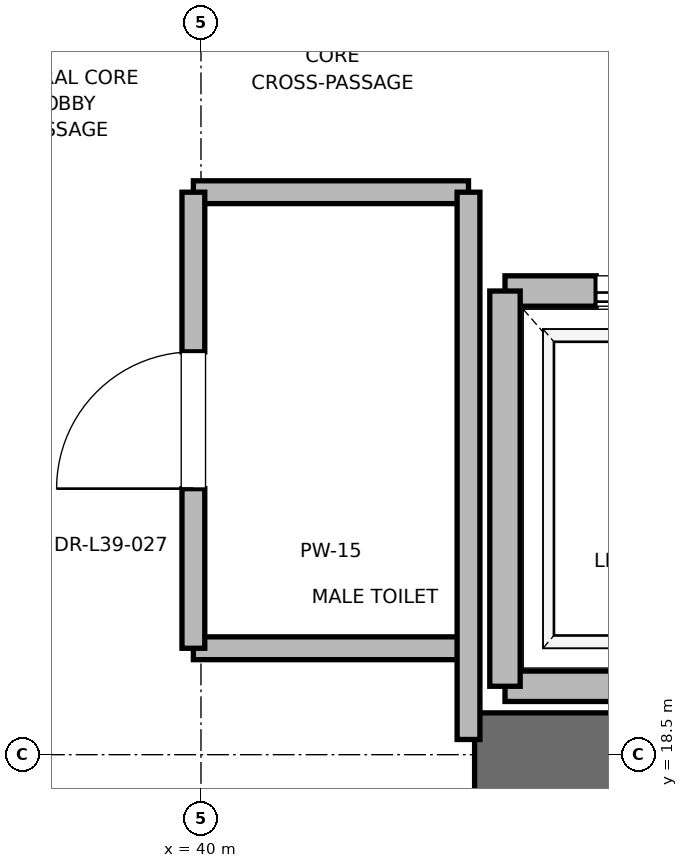
"""IFC4 building model, lengths in metres.
Left out: names, types, materials, properties, quantities, classifications, styles, units other than length and angle.
Written with IfcOpenShell. Run it as: python <this file> out.ifc"""

import sys

from ifc_helpers import new_model, si_unit, direction, frame, frame_2d, origin, place, context, subcontext, project, spatial, rectangle, extrude, element, fill, save


model = new_model("IFC4")
c1 = context("Model", 3, precision=1e-05, world=origin(), true_north=direction((0.0, 1.0)))
c2 = subcontext(c1, "Body", "Model", "MODEL_VIEW")
j1 = project(units=[si_unit("LENGTHUNIT", "METRE"), si_unit("PLANEANGLEUNIT", "RADIAN")], contexts=[c1])
p1 = place(None, origin())
s1 = spatial("IfcSite", under=j1, at=p1, CompositionType="ELEMENT")
p2 = place(p1, origin())
s2 = spatial("IfcBuilding", under=s1, at=p2, CompositionType="ELEMENT")
p3 = place(p2, frame((0.0, 0.0, 168.4)))
s3 = spatial("IfcBuildingStorey", under=s2, at=p3, CompositionType="ELEMENT", Elevation=168.4)
p4 = place(p3, frame((41.8, 18.5, 0.0), z_axis=(0.0, 0.0, 1.0), x_axis=(1.0, 0.0, 0.0)))
e1 = element("IfcWall", 1, at=p4, inside=s3, PredefinedType="SHEAR", context=c2, shape_type="SweptSolid", body=[
    extrude(rectangle(XDim=9.2, YDim=0.55, at=frame_2d((4.6, 0.0))), origin(), (0.0, 0.0, 1.0), 3.775),
])
p5 = place(p3, frame((42.0, 18.95, 0.0), z_axis=(0.0, 0.0, 1.0), x_axis=(1.0, 0.0, 0.0)))
e2 = element("IfcWall", 2, at=p5, inside=s3, PredefinedType="SOLIDWALL", context=c2, shape_type="SweptSolid", body=[
    extrude(rectangle(XDim=2.3, YDim=0.2, at=frame_2d((1.15, 0.0))), origin(), (0.0, 0.0, 1.0), 2.755),
])
p6 = place(p3, frame((44.3, 21.55, 0.0), z_axis=(0.0, 0.0, 1.0), x_axis=(-1.0, 0.0, 0.0)))
e3 = element("IfcWall", 3, at=p6, inside=s3, PredefinedType="SOLIDWALL", context=c2, shape_type="SweptSolid", body=[
    extrude(rectangle(XDim=2.3, YDim=0.2, at=frame_2d((1.15, 0.0))), origin(), (0.0, 0.0, 1.0), 3.775),
])
p7 = place(p6, frame((0.6, 0.0, 0.0)))
e4 = element("IfcOpeningElement", 4, at=p7, cuts=e3, PredefinedType="OPENING", context=c2, shape_type="SweptSolid", body=[
    extrude(rectangle(XDim=1.1, YDim=2.2, at=frame_2d((0.55, 1.1))), frame((0.0, 0.1, 0.0), z_axis=(0.0, -1.0, 0.0), x_axis=(1.0, 0.0, 0.0)), (0.0, 0.0, 1.0), 0.2),
])
p8 = place(p3, frame((42.0, 21.55, 0.0), z_axis=(0.0, 0.0, 1.0), x_axis=(0.0, -1.0, 0.0)))
e5 = element("IfcWall", 5, at=p8, inside=s3, PredefinedType="SOLIDWALL", context=c2, shape_type="SweptSolid", body=[
    extrude(rectangle(XDim=2.6, YDim=0.2, at=frame_2d((1.3, 0.0))), origin(), (0.0, 0.0, 1.0), 2.755),
])
for number, where, z_axis, x_axis in (
    (6, (39.95, 19.2, 0.0), (0.0, 0.0, 1.0), (1.0, 0.0, 0.0)),
    (7, (39.95, 22.2, 0.0), (0.0, 0.0, 1.0), (1.0, 0.0, 0.0)),
):
    element("IfcWall", number, at=place(p3, frame(where, z_axis=z_axis, x_axis=x_axis)), inside=s3, PredefinedType="PARTITIONING", context=c2, shape_type="SweptSolid", body=[
        extrude(rectangle(XDim=1.81, YDim=0.15, at=frame_2d((0.905, 0.0))), origin(), (0.0, 0.0, 1.0), 2.85),
    ])
p9 = place(p3, frame((41.76, 18.6, 0.0), z_axis=(0.0, 0.0, 1.0), x_axis=(0.0, 1.0, 0.0)))
e8 = element("IfcWall", 8, at=p9, inside=s3, PredefinedType="PARTITIONING", context=c2, shape_type="SweptSolid", body=[
    extrude(rectangle(XDim=3.6, YDim=0.15, at=frame_2d((1.8, 0.0))), origin(), (0.0, 0.0, 1.0), 2.755),
])
p10 = place(p3, frame((39.95, 19.2, 0.0), z_axis=(0.0, 0.0, 1.0), x_axis=(0.0, 1.0, 0.0)))
e9 = element("IfcWall", 9, at=p10, inside=s3, PredefinedType="PARTITIONING", context=c2, shape_type="SweptSolid", body=[
    extrude(rectangle(XDim=3.0, YDim=0.15, at=frame_2d((1.5, 0.0))), origin(), (0.0, 0.0, 1.0), 2.85),
])
p11 = place(p10, frame((1.05, 0.0, 0.0)))
e10 = element("IfcOpeningElement", 10, at=p11, cuts=e9, PredefinedType="OPENING", context=c2, shape_type="SweptSolid", body=[
    extrude(rectangle(XDim=0.9, YDim=2.1, at=frame_2d((0.45, 1.05))), frame((0.0, 0.075, 0.0), z_axis=(0.0, -1.0, 0.0), x_axis=(1.0, 0.0, 0.0)), (0.0, 0.0, 1.0), 0.15),
])
p12 = place(p7, origin())
e11 = element("IfcDoor", 11, at=p12, inside=s3, OperationType="SLIDING_TO_RIGHT", PredefinedType="DOOR", context=c2, shape_type="SweptSolid", body=[
    extrude(rectangle(XDim=1.1, YDim=2.2, at=frame_2d((0.55, 1.1))), frame((0.0, 0.025, 0.0), z_axis=(0.0, -1.0, 0.0), x_axis=(1.0, 0.0, 0.0)), (0.0, 0.0, 1.0), 0.05),
])
fill(e4, e11)
p13 = place(p11, origin())
e12 = element("IfcDoor", 12, at=p13, inside=s3, OperationType="SINGLE_SWING_LEFT", PredefinedType="DOOR", context=c2, shape_type="SweptSolid", body=[
    extrude(rectangle(XDim=0.9, YDim=2.1, at=frame_2d((0.45, 1.05))), frame((0.0, 0.025, 0.0), z_axis=(0.0, -1.0, 0.0), x_axis=(1.0, 0.0, 0.0)), (0.0, 0.0, 1.0), 0.05),
])
fill(e10, e12)
save(model, sys.argv[1])
